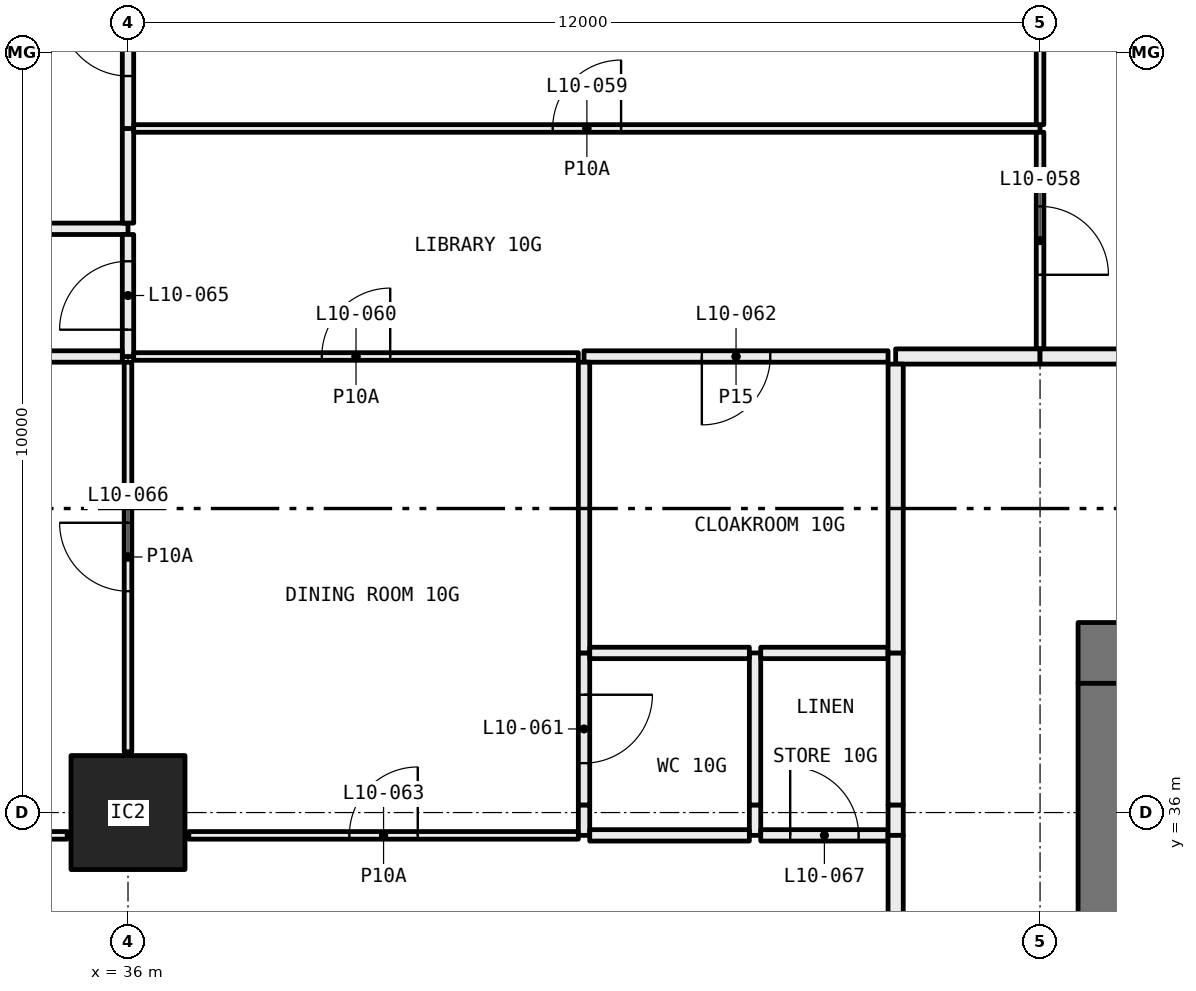
"""IFC4 building model, lengths in metres.
Left out: names, types, materials, properties, quantities, classifications, styles, units other than length and angle.
Written with IfcOpenShell. Run it as: python <this file> out.ifc"""

import sys

from ifc_helpers import new_model, si_unit, direction, frame, frame_2d, origin, origin_2d, place, context, subcontext, project, spatial, rectangle, hollow_rectangle, extrude, element, fill, save


model = new_model("IFC4")
c1 = context("Model", 3, precision=1e-05, world=origin(), true_north=direction((0.0, 1.0)))
c2 = subcontext(c1, "Body", "Model", "MODEL_VIEW")
j1 = project(units=[si_unit("LENGTHUNIT", "METRE"), si_unit("PLANEANGLEUNIT", "RADIAN")], contexts=[c1])
p1 = place(None, origin())
s1 = spatial("IfcSite", under=j1, at=p1, CompositionType="ELEMENT")
p2 = place(p1, origin())
s2 = spatial("IfcBuilding", under=s1, at=p2, CompositionType="ELEMENT")
p3 = place(p2, frame((0.0, 0.0, 47.25)))
s3 = spatial("IfcBuildingStorey", under=s2, at=p3, CompositionType="ELEMENT", Elevation=47.25)
p4 = place(p3, frame((36.0, 36.0, 0.0), z_axis=(0.0, 0.0, 1.0), x_axis=(1.0, 0.0, 0.0)))
e1 = element("IfcColumn", 1, at=p4, inside=s3, PredefinedType="COLUMN", context=c2, shape_type="SweptSolid", body=[
    extrude(hollow_rectangle(XDim=1.5, YDim=1.5, WallThickness=0.065, at=origin_2d()), origin(), (0.0, 0.0, 1.0), 3.05),
])
p5 = place(p3, frame((30.1, 43.68, 0.0), z_axis=(0.0, 0.0, 1.0), x_axis=(1.0, 0.0, 0.0)))
e2 = element("IfcWall", 2, at=p5, inside=s3, PredefinedType="PARTITIONING", context=c2, shape_type="SweptSolid", body=[
    extrude(rectangle(XDim=5.9, YDim=0.15, at=frame_2d((2.95, 0.0))), origin(), (0.0, 0.0, 1.0), 2.45),
])
p6 = place(p3, frame((36.0, 43.755, 0.0), z_axis=(0.0, 0.0, 1.0), x_axis=(0.0, 1.0, 0.0)))
e3 = element("IfcWall", 3, at=p6, inside=s3, PredefinedType="PARTITIONING", context=c2, shape_type="SweptSolid", body=[
    extrude(rectangle(XDim=1.245, YDim=0.15, at=frame_2d((0.623, 0.0))), origin(), (0.0, 0.0, 1.0), 2.45),
])
p7 = place(p3, frame((36.0, 45.0, 0.0), z_axis=(0.0, 0.0, 1.0), x_axis=(0.0, 1.0, 0.0)))
e4 = element("IfcWall", 4, at=p7, inside=s3, PredefinedType="PARTITIONING", context=c2, shape_type="SweptSolid", body=[
    extrude(rectangle(XDim=2.28, YDim=0.15, at=frame_2d((1.14, 0.0))), origin(), (0.0, 0.0, 1.0), 2.45),
])
p8 = place(p7, frame((0.69, 0.0, 0.0)))
e5 = element("IfcOpeningElement", 5, at=p8, cuts=e4, PredefinedType="OPENING", context=c2, shape_type="SweptSolid", body=[
    extrude(rectangle(XDim=0.9, YDim=2.1, at=frame_2d((0.45, 1.05))), frame((0.0, 0.085, 0.0), z_axis=(0.0, -1.0, 0.0), x_axis=(1.0, 0.0, 0.0)), (0.0, 0.0, 1.0), 0.17),
])
p9 = place(p3, frame((36.0, 42.0, 0.0), z_axis=(0.0, 0.0, 1.0), x_axis=(0.0, 1.0, 0.0)))
e6 = element("IfcWall", 6, at=p9, inside=s3, PredefinedType="PARTITIONING", context=c2, shape_type="SweptSolid", body=[
    extrude(rectangle(XDim=1.605, YDim=0.15, at=frame_2d((0.802, 0.0))), origin(), (0.0, 0.0, 1.0), 2.45),
])
p10 = place(p9, frame((0.353, 0.0, 0.0)))
e7 = element("IfcOpeningElement", 7, at=p10, cuts=e6, PredefinedType="OPENING", context=c2, shape_type="SweptSolid", body=[
    extrude(rectangle(XDim=0.9, YDim=2.1, at=frame_2d((0.45, 1.05))), frame((0.0, 0.085, 0.0), z_axis=(0.0, -1.0, 0.0), x_axis=(1.0, 0.0, 0.0)), (0.0, 0.0, 1.0), 0.17),
])
p11 = place(p3, frame((30.1, 42.0, 0.0), z_axis=(0.0, 0.0, 1.0), x_axis=(1.0, 0.0, 0.0)))
e8 = element("IfcWall", 8, at=p11, inside=s3, PredefinedType="PARTITIONING", context=c2, shape_type="SweptSolid", body=[
    extrude(rectangle(XDim=5.825, YDim=0.15, at=frame_2d((2.913, 0.0))), origin(), (0.0, 0.0, 1.0), 2.45),
])
p12 = place(p3, frame((48.0, 45.0, 0.0), z_axis=(0.0, 0.0, 1.0), x_axis=(-1.0, 0.0, 0.0)))
e9 = element("IfcWall", 9, at=p12, inside=s3, PredefinedType="PARTITIONING", context=c2, shape_type="SweptSolid", body=[
    extrude(rectangle(XDim=11.925, YDim=0.1, at=frame_2d((5.962, 0.0))), origin(), (0.0, 0.0, 1.0), 2.45),
])
p13 = place(p12, frame((5.512, 0.0, 0.0)))
e10 = element("IfcOpeningElement", 10, at=p13, cuts=e9, PredefinedType="OPENING", context=c2, shape_type="SweptSolid", body=[
    extrude(rectangle(XDim=0.9, YDim=2.1, at=frame_2d((0.45, 1.05))), frame((0.0, 0.06, 0.0), z_axis=(0.0, -1.0, 0.0), x_axis=(1.0, 0.0, 0.0)), (0.0, 0.0, 1.0), 0.12),
])
p14 = place(p3, frame((48.0, 42.1, 0.0), z_axis=(0.0, 0.0, 1.0), x_axis=(0.0, 1.0, 0.0)))
e11 = element("IfcWall", 11, at=p14, inside=s3, PredefinedType="PARTITIONING", context=c2, shape_type="SweptSolid", body=[
    extrude(rectangle(XDim=2.85, YDim=0.1, at=frame_2d((1.425, 0.0))), origin(), (0.0, 0.0, 1.0), 3.05),
])
p15 = place(p14, frame((0.975, 0.0, 0.0)))
e12 = element("IfcOpeningElement", 12, at=p15, cuts=e11, PredefinedType="OPENING", context=c2, shape_type="SweptSolid", body=[
    extrude(rectangle(XDim=0.9, YDim=2.1, at=frame_2d((0.45, 1.05))), frame((0.0, 0.06, 0.0), z_axis=(0.0, -1.0, 0.0), x_axis=(1.0, 0.0, 0.0)), (0.0, 0.0, 1.0), 0.12),
])
p16 = place(p3, frame((36.075, 42.0, 0.0), z_axis=(0.0, 0.0, 1.0), x_axis=(1.0, 0.0, 0.0)))
e13 = element("IfcWall", 13, at=p16, inside=s3, PredefinedType="PARTITIONING", context=c2, shape_type="SweptSolid", body=[
    extrude(rectangle(XDim=5.85, YDim=0.1, at=frame_2d((2.925, 0.0))), origin(), (0.0, 0.0, 1.0), 2.45),
])
p17 = place(p16, frame((2.475, 0.0, 0.0)))
e14 = element("IfcOpeningElement", 14, at=p17, cuts=e13, PredefinedType="OPENING", context=c2, shape_type="SweptSolid", body=[
    extrude(rectangle(XDim=0.9, YDim=2.1, at=frame_2d((0.45, 1.05))), frame((0.0, 0.06, 0.0), z_axis=(0.0, -1.0, 0.0), x_axis=(1.0, 0.0, 0.0)), (0.0, 0.0, 1.0), 0.12),
])
p18 = place(p3, frame((42.0, 42.0, 0.0), z_axis=(0.0, 0.0, 1.0), x_axis=(1.0, 0.0, 0.0)))
e15 = element("IfcWall", 15, at=p18, inside=s3, PredefinedType="PARTITIONING", context=c2, shape_type="SweptSolid", body=[
    extrude(rectangle(XDim=4.0, YDim=0.15, at=frame_2d((2.0, 0.0))), origin(), (0.0, 0.0, 1.0), 3.05),
])
p19 = place(p18, frame((1.55, 0.0, 0.0)))
e16 = element("IfcOpeningElement", 16, at=p19, cuts=e15, PredefinedType="OPENING", context=c2, shape_type="SweptSolid", body=[
    extrude(rectangle(XDim=0.9, YDim=2.1, at=frame_2d((0.45, 1.05))), frame((0.0, 0.085, 0.0), z_axis=(0.0, -1.0, 0.0), x_axis=(1.0, 0.0, 0.0)), (0.0, 0.0, 1.0), 0.17),
])
p20 = place(p3, frame((46.1, 42.0, 0.0), z_axis=(0.0, 0.0, 1.0), x_axis=(1.0, 0.0, 0.0)))
e17 = element("IfcWall", 17, at=p20, inside=s3, PredefinedType="PARTITIONING", context=c2, shape_type="SweptSolid", body=[
    extrude(rectangle(XDim=1.9, YDim=0.2, at=frame_2d((0.95, 0.0))), origin(), (0.0, 0.0, 1.0), 3.05),
])
p21 = place(p3, frame((48.0, 45.05, 0.0), z_axis=(0.0, 0.0, 1.0), x_axis=(0.0, 1.0, 0.0)))
e18 = element("IfcWall", 18, at=p21, inside=s3, PredefinedType="PARTITIONING", context=c2, shape_type="SweptSolid", body=[
    extrude(rectangle(XDim=2.23, YDim=0.1, at=frame_2d((1.115, 0.0))), origin(), (0.0, 0.0, 1.0), 3.05),
])
p22 = place(p3, frame((48.0, 42.0, 0.0), z_axis=(0.0, 0.0, 1.0), x_axis=(1.0, 0.0, 0.0)))
e19 = element("IfcWall", 19, at=p22, inside=s3, PredefinedType="PARTITIONING", context=c2, shape_type="SweptSolid", body=[
    extrude(rectangle(XDim=6.0, YDim=0.2, at=frame_2d((3.0, 0.0))), origin(), (0.0, 0.0, 1.0), 3.05),
])
p23 = place(p3, frame((36.0, 36.8, 0.0), z_axis=(0.0, 0.0, 1.0), x_axis=(0.0, 1.0, 0.0)))
e20 = element("IfcWall", 20, at=p23, inside=s3, PredefinedType="PARTITIONING", context=c2, shape_type="SweptSolid", body=[
    extrude(rectangle(XDim=5.125, YDim=0.1, at=frame_2d((2.562, 0.0))), origin(), (0.0, 0.0, 1.0), 2.45),
])
p24 = place(p23, frame((2.113, 0.0, 0.0)))
e21 = element("IfcOpeningElement", 21, at=p24, cuts=e20, PredefinedType="OPENING", context=c2, shape_type="SweptSolid", body=[
    extrude(rectangle(XDim=0.9, YDim=2.1, at=frame_2d((0.45, 1.05))), frame((0.0, 0.06, 0.0), z_axis=(0.0, -1.0, 0.0), x_axis=(1.0, 0.0, 0.0)), (0.0, 0.0, 1.0), 0.12),
])
p25 = place(p3, frame((34.575, 35.7, 0.0), z_axis=(0.0, 0.0, 1.0), x_axis=(1.0, 0.0, 0.0)))
e22 = element("IfcWall", 22, at=p25, inside=s3, PredefinedType="PARTITIONING", context=c2, shape_type="SweptSolid", body=[
    extrude(rectangle(XDim=0.625, YDim=0.1, at=frame_2d((0.312, 0.0))), origin(), (0.0, 0.0, 1.0), 3.05),
])
p26 = place(p3, frame((42.0, 35.7, 0.0), z_axis=(0.0, 0.0, 1.0), x_axis=(0.0, 1.0, 0.0)))
e23 = element("IfcWall", 23, at=p26, inside=s3, PredefinedType="PARTITIONING", context=c2, shape_type="SweptSolid", body=[
    extrude(rectangle(XDim=0.4, YDim=0.15, at=frame_2d((0.2, 0.0))), origin(), (0.0, 0.0, 1.0), 2.45),
])
p27 = place(p3, frame((42.0, 36.1, 0.0), z_axis=(0.0, 0.0, 1.0), x_axis=(0.0, 1.0, 0.0)))
e24 = element("IfcWall", 24, at=p27, inside=s3, PredefinedType="PARTITIONING", context=c2, shape_type="SweptSolid", body=[
    extrude(rectangle(XDim=2.0, YDim=0.15, at=frame_2d((1.0, 0.0))), origin(), (0.0, 0.0, 1.0), 3.05),
])
p28 = place(p27, frame((0.55, 0.0, 0.0)))
e25 = element("IfcOpeningElement", 25, at=p28, cuts=e24, PredefinedType="OPENING", context=c2, shape_type="SweptSolid", body=[
    extrude(rectangle(XDim=0.9, YDim=2.1, at=frame_2d((0.45, 1.05))), frame((0.0, 0.085, 0.0), z_axis=(0.0, -1.0, 0.0), x_axis=(1.0, 0.0, 0.0)), (0.0, 0.0, 1.0), 0.17),
])
p29 = place(p3, frame((42.0, 38.1, 0.0), z_axis=(0.0, 0.0, 1.0), x_axis=(0.0, 1.0, 0.0)))
e26 = element("IfcWall", 26, at=p29, inside=s3, PredefinedType="PARTITIONING", context=c2, shape_type="SweptSolid", body=[
    extrude(rectangle(XDim=3.825, YDim=0.15, at=frame_2d((1.913, 0.0))), origin(), (0.0, 0.0, 1.0), 3.05),
])
p30 = place(p3, frame((36.8, 35.7, 0.0), z_axis=(0.0, 0.0, 1.0), x_axis=(1.0, 0.0, 0.0)))
e27 = element("IfcWall", 27, at=p30, inside=s3, PredefinedType="PARTITIONING", context=c2, shape_type="SweptSolid", body=[
    extrude(rectangle(XDim=5.125, YDim=0.1, at=frame_2d((2.562, 0.0))), origin(), (0.0, 0.0, 1.0), 3.05),
])
p31 = place(p30, frame((2.113, 0.0, 0.0)))
e28 = element("IfcOpeningElement", 28, at=p31, cuts=e27, PredefinedType="OPENING", context=c2, shape_type="SweptSolid", body=[
    extrude(rectangle(XDim=0.9, YDim=2.1, at=frame_2d((0.45, 1.05))), frame((0.0, 0.06, 0.0), z_axis=(0.0, -1.0, 0.0), x_axis=(1.0, 0.0, 0.0)), (0.0, 0.0, 1.0), 0.12),
])
p32 = place(p3, frame((44.25, 35.7, 0.0), z_axis=(0.0, 0.0, 1.0), x_axis=(0.0, 1.0, 0.0)))
e29 = element("IfcWall", 29, at=p32, inside=s3, PredefinedType="PARTITIONING", context=c2, shape_type="SweptSolid", body=[
    extrude(rectangle(XDim=0.4, YDim=0.15, at=frame_2d((0.2, 0.0))), origin(), (0.0, 0.0, 1.0), 2.45),
])
p33 = place(p3, frame((44.25, 36.1, 0.0), z_axis=(0.0, 0.0, 1.0), x_axis=(0.0, 1.0, 0.0)))
e30 = element("IfcWall", 30, at=p33, inside=s3, PredefinedType="PARTITIONING", context=c2, shape_type="SweptSolid", body=[
    extrude(rectangle(XDim=2.0, YDim=0.15, at=frame_2d((1.0, 0.0))), origin(), (0.0, 0.0, 1.0), 3.05),
])
for number, where, z_axis, x_axis in (
    (31, (44.175, 38.1, 0.0), (0.0, 0.0, 1.0), (-1.0, 0.0, 0.0)),
    (32, (42.075, 35.7, 0.0), (0.0, 0.0, 1.0), (1.0, 0.0, 0.0)),
):
    element("IfcWall", number, at=place(p3, frame(where, z_axis=z_axis, x_axis=x_axis)), inside=s3, PredefinedType="PARTITIONING", context=c2, shape_type="SweptSolid", body=[
        extrude(rectangle(XDim=2.1, YDim=0.15, at=frame_2d((1.05, 0.0))), origin(), (0.0, 0.0, 1.0), 3.05),
    ])
p34 = place(p3, frame((46.0, 38.1, 0.0), z_axis=(0.0, 0.0, 1.0), x_axis=(-1.0, 0.0, 0.0)))
e33 = element("IfcWall", 33, at=p34, inside=s3, PredefinedType="PARTITIONING", context=c2, shape_type="SweptSolid", body=[
    extrude(rectangle(XDim=1.675, YDim=0.15, at=frame_2d((0.837, 0.0))), origin(), (0.0, 0.0, 1.0), 3.05),
])
p35 = place(p3, frame((44.325, 35.7, 0.0), z_axis=(0.0, 0.0, 1.0), x_axis=(1.0, 0.0, 0.0)))
e34 = element("IfcWall", 34, at=p35, inside=s3, PredefinedType="PARTITIONING", context=c2, shape_type="SweptSolid", body=[
    extrude(rectangle(XDim=1.675, YDim=0.15, at=frame_2d((0.837, 0.0))), origin(), (0.0, 0.0, 1.0), 3.05),
])
p36 = place(p35, frame((0.387, 0.0, 0.0)))
e35 = element("IfcOpeningElement", 35, at=p36, cuts=e34, PredefinedType="OPENING", context=c2, shape_type="SweptSolid", body=[
    extrude(rectangle(XDim=0.9, YDim=2.1, at=frame_2d((0.45, 1.05))), frame((0.0, 0.085, 0.0), z_axis=(0.0, -1.0, 0.0), x_axis=(1.0, 0.0, 0.0)), (0.0, 0.0, 1.0), 0.17),
])
p37 = place(p3, frame((46.1, 35.7, 0.0), z_axis=(0.0, 0.0, 1.0), x_axis=(0.0, 1.0, 0.0)))
e36 = element("IfcWall", 36, at=p37, inside=s3, PredefinedType="PARTITIONING", context=c2, shape_type="SweptSolid", body=[
    extrude(rectangle(XDim=0.4, YDim=0.2, at=frame_2d((0.2, 0.0))), origin(), (0.0, 0.0, 1.0), 2.45),
])
p38 = place(p3, frame((46.1, 36.1, 0.0), z_axis=(0.0, 0.0, 1.0), x_axis=(0.0, 1.0, 0.0)))
e37 = element("IfcWall", 37, at=p38, inside=s3, PredefinedType="PARTITIONING", context=c2, shape_type="SweptSolid", body=[
    extrude(rectangle(XDim=2.0, YDim=0.2, at=frame_2d((1.0, 0.0))), origin(), (0.0, 0.0, 1.0), 3.05),
])
p39 = place(p3, frame((46.1, 38.1, 0.0), z_axis=(0.0, 0.0, 1.0), x_axis=(0.0, 1.0, 0.0)))
e38 = element("IfcWall", 38, at=p39, inside=s3, PredefinedType="PARTITIONING", context=c2, shape_type="SweptSolid", body=[
    extrude(rectangle(XDim=3.8, YDim=0.2, at=frame_2d((1.9, 0.0))), origin(), (0.0, 0.0, 1.0), 3.05),
])
p40 = place(p3, frame((46.1, 31.3, 0.0), z_axis=(0.0, 0.0, 1.0), x_axis=(0.0, 1.0, 0.0)))
e39 = element("IfcWall", 39, at=p40, inside=s3, PredefinedType="PARTITIONING", context=c2, shape_type="SweptSolid", body=[
    extrude(rectangle(XDim=4.4, YDim=0.2, at=frame_2d((2.2, 0.0))), origin(), (0.0, 0.0, 1.0), 3.05),
])
p41 = place(p3, frame((59.5, 38.1, 0.0), z_axis=(0.0, 0.0, 1.0), x_axis=(-1.0, 0.0, 0.0)))
e40 = element("IfcWall", 40, at=p41, inside=s3, PredefinedType="SHEAR", context=c2, shape_type="SweptSolid", body=[
    extrude(rectangle(XDim=11.0, YDim=0.8, at=frame_2d((5.5, 0.0))), origin(), (0.0, 0.0, 1.0), 3.05),
])
p42 = place(p41, frame((8.4, 0.0, 0.0)))
e41 = element("IfcOpeningElement", 41, at=p42, cuts=e40, PredefinedType="OPENING", context=c2, shape_type="SweptSolid", body=[
    extrude(rectangle(XDim=1.6, YDim=2.1, at=frame_2d((0.8, 1.05))), frame((0.0, 0.41, 0.0), z_axis=(0.0, -1.0, 0.0), x_axis=(1.0, 0.0, 0.0)), (0.0, 0.0, 1.0), 0.82),
])
p43 = place(p3, frame((48.9, 22.3, 0.0), z_axis=(0.0, 0.0, 1.0), x_axis=(0.0, 1.0, 0.0)))
e42 = element("IfcWall", 42, at=p43, inside=s3, PredefinedType="SHEAR", context=c2, shape_type="SweptSolid", body=[
    extrude(rectangle(XDim=15.4, YDim=0.8, at=frame_2d((7.7, 0.0))), origin(), (0.0, 0.0, 1.0), 3.05),
])
p44 = place(p43, frame((6.9, 0.0, 0.0)))
e43 = element("IfcOpeningElement", 43, at=p44, cuts=e42, PredefinedType="OPENING", context=c2, shape_type="SweptSolid", body=[
    extrude(rectangle(XDim=1.6, YDim=2.1, at=frame_2d((0.8, 1.05))), frame((0.0, 0.41, 0.0), z_axis=(0.0, -1.0, 0.0), x_axis=(1.0, 0.0, 0.0)), (0.0, 0.0, 1.0), 0.82),
])
p45 = place(p15, frame((0.9, 0.0, 0.0), x_axis=(-1.0, 0.0, 0.0)))
e44 = element("IfcDoor", 44, at=p45, inside=s3, OperationType="SINGLE_SWING_LEFT", PredefinedType="DOOR", context=c2, shape_type="SweptSolid", body=[
    extrude(rectangle(XDim=0.9, YDim=2.1, at=frame_2d((0.45, 1.05))), frame((0.0, 0.025, 0.0), z_axis=(0.0, -1.0, 0.0), x_axis=(1.0, 0.0, 0.0)), (0.0, 0.0, 1.0), 0.05),
])
fill(e12, e44)
p46 = place(p13, frame((0.9, 0.0, 0.0), x_axis=(-1.0, 0.0, 0.0)))
e45 = element("IfcDoor", 45, at=p46, inside=s3, OperationType="SINGLE_SWING_LEFT", PredefinedType="DOOR", context=c2, shape_type="SweptSolid", body=[
    extrude(rectangle(XDim=0.9, YDim=2.1, at=frame_2d((0.45, 1.05))), frame((0.0, 0.025, 0.0), z_axis=(0.0, -1.0, 0.0), x_axis=(1.0, 0.0, 0.0)), (0.0, 0.0, 1.0), 0.05),
])
fill(e10, e45)
p47 = place(p17, origin())
e46 = element("IfcDoor", 46, at=p47, inside=s3, OperationType="SINGLE_SWING_LEFT", PredefinedType="DOOR", context=c2, shape_type="SweptSolid", body=[
    extrude(rectangle(XDim=0.9, YDim=2.1, at=frame_2d((0.45, 1.05))), frame((0.0, 0.025, 0.0), z_axis=(0.0, -1.0, 0.0), x_axis=(1.0, 0.0, 0.0)), (0.0, 0.0, 1.0), 0.05),
])
fill(e14, e46)
p48 = place(p28, frame((0.9, 0.0, 0.0), x_axis=(-1.0, 0.0, 0.0)))
e47 = element("IfcDoor", 47, at=p48, inside=s3, OperationType="SINGLE_SWING_RIGHT", PredefinedType="DOOR", context=c2, shape_type="SweptSolid", body=[
    extrude(rectangle(XDim=0.9, YDim=2.1, at=frame_2d((0.45, 1.05))), frame((0.0, 0.025, 0.0), z_axis=(0.0, -1.0, 0.0), x_axis=(1.0, 0.0, 0.0)), (0.0, 0.0, 1.0), 0.05),
])
fill(e25, e47)
p49 = place(p19, frame((0.9, 0.0, 0.0), x_axis=(-1.0, 0.0, 0.0)))
e48 = element("IfcDoor", 48, at=p49, inside=s3, OperationType="SINGLE_SWING_LEFT", PredefinedType="DOOR", context=c2, shape_type="SweptSolid", body=[
    extrude(rectangle(XDim=0.9, YDim=2.1, at=frame_2d((0.45, 1.05))), frame((0.0, 0.025, 0.0), z_axis=(0.0, -1.0, 0.0), x_axis=(1.0, 0.0, 0.0)), (0.0, 0.0, 1.0), 0.05),
])
fill(e16, e48)
p50 = place(p31, origin())
e49 = element("IfcDoor", 49, at=p50, inside=s3, OperationType="SINGLE_SWING_LEFT", PredefinedType="DOOR", context=c2, shape_type="SweptSolid", body=[
    extrude(rectangle(XDim=0.9, YDim=2.1, at=frame_2d((0.45, 1.05))), frame((0.0, 0.025, 0.0), z_axis=(0.0, -1.0, 0.0), x_axis=(1.0, 0.0, 0.0)), (0.0, 0.0, 1.0), 0.05),
])
fill(e28, e49)
p51 = place(p8, origin())
e50 = element("IfcDoor", 50, at=p51, inside=s3, OperationType="SINGLE_SWING_LEFT", PredefinedType="DOOR", context=c2, shape_type="SweptSolid", body=[
    extrude(rectangle(XDim=0.9, YDim=2.1, at=frame_2d((0.45, 1.05))), frame((0.0, 0.025, 0.0), z_axis=(0.0, -1.0, 0.0), x_axis=(1.0, 0.0, 0.0)), (0.0, 0.0, 1.0), 0.05),
])
fill(e5, e50)
p52 = place(p10, origin())
e51 = element("IfcDoor", 51, at=p52, inside=s3, OperationType="SINGLE_SWING_RIGHT", PredefinedType="DOOR", context=c2, shape_type="SweptSolid", body=[
    extrude(rectangle(XDim=0.9, YDim=2.1, at=frame_2d((0.45, 1.05))), frame((0.0, 0.025, 0.0), z_axis=(0.0, -1.0, 0.0), x_axis=(1.0, 0.0, 0.0)), (0.0, 0.0, 1.0), 0.05),
])
fill(e7, e51)
p53 = place(p24, origin())
e52 = element("IfcDoor", 52, at=p53, inside=s3, OperationType="SINGLE_SWING_LEFT", PredefinedType="DOOR", context=c2, shape_type="SweptSolid", body=[
    extrude(rectangle(XDim=0.9, YDim=2.1, at=frame_2d((0.45, 1.05))), frame((0.0, 0.025, 0.0), z_axis=(0.0, -1.0, 0.0), x_axis=(1.0, 0.0, 0.0)), (0.0, 0.0, 1.0), 0.05),
])
fill(e21, e52)
p54 = place(p36, origin())
e53 = element("IfcDoor", 53, at=p54, inside=s3, OperationType="SINGLE_SWING_RIGHT", PredefinedType="DOOR", context=c2, shape_type="SweptSolid", body=[
    extrude(rectangle(XDim=0.9, YDim=2.1, at=frame_2d((0.45, 1.05))), frame((0.0, 0.025, 0.0), z_axis=(0.0, -1.0, 0.0), x_axis=(1.0, 0.0, 0.0)), (0.0, 0.0, 1.0), 0.05),
])
fill(e35, e53)
save(model, sys.argv[1])
